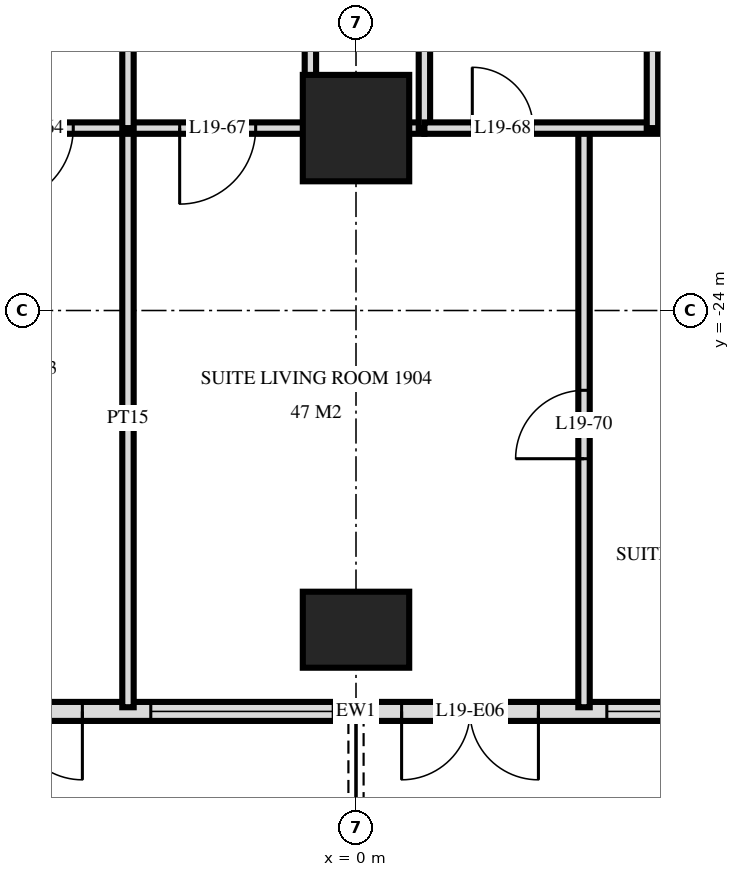
"""IFC4 building model, lengths in metres.
Left out: names, types, materials, properties, quantities, classifications, styles, units other than length and angle.
Written with IfcOpenShell. Run it as: python <this file> out.ifc"""

import sys

from ifc_helpers import new_model, si_unit, direction, frame, frame_2d, origin, origin_2d, place, context, subcontext, project, spatial, rectangle, extrude, element, fill, save


model = new_model("IFC4")
c1 = context("Model", 3, precision=1e-05, world=origin(), true_north=direction((0.0, 1.0)))
c2 = subcontext(c1, "Body", "Model", "MODEL_VIEW")
j1 = project(units=[si_unit("LENGTHUNIT", "METRE"), si_unit("PLANEANGLEUNIT", "RADIAN")], contexts=[c1])
p1 = place(None, origin())
s1 = spatial("IfcSite", under=j1, at=p1, CompositionType="ELEMENT")
p2 = place(p1, origin())
s2 = spatial("IfcBuilding", under=s1, at=p2, CompositionType="ELEMENT")
p3 = place(p2, frame((0.0, 0.0, 78.0)))
s3 = spatial("IfcBuildingStorey", under=s2, at=p3, CompositionType="ELEMENT", Elevation=78.0)
p4 = place(p3, frame((0.0, -28.2, 0.0), z_axis=(0.0, 0.0, 1.0), x_axis=(1.0, 0.0, 0.0)))
e1 = element("IfcColumn", 1, at=p4, inside=s3, PredefinedType="COLUMN", context=c2, shape_type="SweptSolid", body=[
    extrude(rectangle(XDim=1.4, YDim=1.0, at=origin_2d()), origin(), (0.0, 0.0, 1.0), 3.6),
])
p5 = place(p3, frame((0.0, -21.6, 0.0), z_axis=(0.0, 0.0, 1.0), x_axis=(1.0, 0.0, 0.0)))
e2 = element("IfcColumn", 2, at=p5, inside=s3, PredefinedType="COLUMN", context=c2, shape_type="SweptSolid", body=[
    extrude(rectangle(XDim=1.4, YDim=1.4, at=origin_2d()), origin(), (0.0, 0.0, 1.0), 3.6),
])
p6 = place(p3, frame((-28.775, -29.275, 0.0), z_axis=(0.0, 0.0, 1.0), x_axis=(1.0, 0.0, 0.0)))
e3 = element("IfcWall", 3, at=p6, inside=s3, PredefinedType="SOLIDWALL", context=c2, shape_type="SweptSolid", body=[
    extrude(rectangle(XDim=57.551, YDim=0.25, at=frame_2d((28.775, 0.0))), origin(), (0.0, 0.0, 1.0), 3.32),
])
p7 = place(p6, frame((0.575, 0.0, 0.0)))
e4 = element("IfcOpeningElement", 4, at=p7, cuts=e3, PredefinedType="OPENING", context=c2, shape_type="SweptSolid", body=[
    extrude(rectangle(XDim=1.8, YDim=2.4, at=frame_2d((0.9, 1.2))), frame((0.0, 0.135, 0.0), z_axis=(0.0, -1.0, 0.0), x_axis=(1.0, 0.0, 0.0)), (0.0, 0.0, 1.0), 0.27),
])
p8 = place(p6, frame((5.375, 0.0, 0.0)))
e5 = element("IfcOpeningElement", 5, at=p8, cuts=e3, PredefinedType="OPENING", context=c2, shape_type="SweptSolid", body=[
    extrude(rectangle(XDim=1.8, YDim=2.4, at=frame_2d((0.9, 1.2))), frame((0.0, 0.135, 0.0), z_axis=(0.0, -1.0, 0.0), x_axis=(1.0, 0.0, 0.0)), (0.0, 0.0, 1.0), 0.27),
])
p9 = place(p6, frame((8.075, 0.0, 0.3)))
e6 = element("IfcOpeningElement", 6, at=p9, cuts=e3, PredefinedType="OPENING", context=c2, shape_type="SweptSolid", body=[
    extrude(rectangle(XDim=2.4, YDim=2.1, at=frame_2d((1.2, 1.05))), frame((0.0, 0.135, 0.0), z_axis=(0.0, -1.0, 0.0), x_axis=(1.0, 0.0, 0.0)), (0.0, 0.0, 1.0), 0.27),
])
p10 = place(p6, frame((11.375, 0.0, 0.0)))
e7 = element("IfcOpeningElement", 7, at=p10, cuts=e3, PredefinedType="OPENING", context=c2, shape_type="SweptSolid", body=[
    extrude(rectangle(XDim=1.8, YDim=2.4, at=frame_2d((0.9, 1.2))), frame((0.0, 0.135, 0.0), z_axis=(0.0, -1.0, 0.0), x_axis=(1.0, 0.0, 0.0)), (0.0, 0.0, 1.0), 0.27),
])
p11 = place(p6, frame((14.075, 0.0, 0.3)))
e8 = element("IfcOpeningElement", 8, at=p11, cuts=e3, PredefinedType="OPENING", context=c2, shape_type="SweptSolid", body=[
    extrude(rectangle(XDim=2.4, YDim=2.1, at=frame_2d((1.2, 1.05))), frame((0.0, 0.135, 0.0), z_axis=(0.0, -1.0, 0.0), x_axis=(1.0, 0.0, 0.0)), (0.0, 0.0, 1.0), 0.27),
])
p12 = place(p6, frame((17.075, 0.0, 0.3)))
e9 = element("IfcOpeningElement", 9, at=p12, cuts=e3, PredefinedType="OPENING", context=c2, shape_type="SweptSolid", body=[
    extrude(rectangle(XDim=2.4, YDim=2.1, at=frame_2d((1.2, 1.05))), frame((0.0, 0.135, 0.0), z_axis=(0.0, -1.0, 0.0), x_axis=(1.0, 0.0, 0.0)), (0.0, 0.0, 1.0), 0.27),
])
p13 = place(p6, frame((20.375, 0.0, 0.0)))
e10 = element("IfcOpeningElement", 10, at=p13, cuts=e3, PredefinedType="OPENING", context=c2, shape_type="SweptSolid", body=[
    extrude(rectangle(XDim=1.8, YDim=2.4, at=frame_2d((0.9, 1.2))), frame((0.0, 0.135, 0.0), z_axis=(0.0, -1.0, 0.0), x_axis=(1.0, 0.0, 0.0)), (0.0, 0.0, 1.0), 0.27),
])
p14 = place(p6, frame((23.375, 0.0, 0.0)))
e11 = element("IfcOpeningElement", 11, at=p14, cuts=e3, PredefinedType="OPENING", context=c2, shape_type="SweptSolid", body=[
    extrude(rectangle(XDim=1.8, YDim=2.4, at=frame_2d((0.9, 1.2))), frame((0.0, 0.135, 0.0), z_axis=(0.0, -1.0, 0.0), x_axis=(1.0, 0.0, 0.0)), (0.0, 0.0, 1.0), 0.27),
])
p15 = place(p6, frame((26.075, 0.0, 0.3)))
e12 = element("IfcOpeningElement", 12, at=p15, cuts=e3, PredefinedType="OPENING", context=c2, shape_type="SweptSolid", body=[
    extrude(rectangle(XDim=2.4, YDim=2.1, at=frame_2d((1.2, 1.05))), frame((0.0, 0.135, 0.0), z_axis=(0.0, -1.0, 0.0), x_axis=(1.0, 0.0, 0.0)), (0.0, 0.0, 1.0), 0.27),
])
p16 = place(p6, frame((29.375, 0.0, 0.0)))
e13 = element("IfcOpeningElement", 13, at=p16, cuts=e3, PredefinedType="OPENING", context=c2, shape_type="SweptSolid", body=[
    extrude(rectangle(XDim=1.8, YDim=2.4, at=frame_2d((0.9, 1.2))), frame((0.0, 0.135, 0.0), z_axis=(0.0, -1.0, 0.0), x_axis=(1.0, 0.0, 0.0)), (0.0, 0.0, 1.0), 0.27),
])
p17 = place(p6, frame((32.075, 0.0, 0.3)))
e14 = element("IfcOpeningElement", 14, at=p17, cuts=e3, PredefinedType="OPENING", context=c2, shape_type="SweptSolid", body=[
    extrude(rectangle(XDim=2.4, YDim=2.1, at=frame_2d((1.2, 1.05))), frame((0.0, 0.135, 0.0), z_axis=(0.0, -1.0, 0.0), x_axis=(1.0, 0.0, 0.0)), (0.0, 0.0, 1.0), 0.27),
])
p18 = place(p6, frame((35.375, 0.0, 0.0)))
e15 = element("IfcOpeningElement", 15, at=p18, cuts=e3, PredefinedType="OPENING", context=c2, shape_type="SweptSolid", body=[
    extrude(rectangle(XDim=1.8, YDim=2.4, at=frame_2d((0.9, 1.2))), frame((0.0, 0.135, 0.0), z_axis=(0.0, -1.0, 0.0), x_axis=(1.0, 0.0, 0.0)), (0.0, 0.0, 1.0), 0.27),
])
p19 = place(p6, frame((38.075, 0.0, 0.3)))
e16 = element("IfcOpeningElement", 16, at=p19, cuts=e3, PredefinedType="OPENING", context=c2, shape_type="SweptSolid", body=[
    extrude(rectangle(XDim=2.4, YDim=2.1, at=frame_2d((1.2, 1.05))), frame((0.0, 0.135, 0.0), z_axis=(0.0, -1.0, 0.0), x_axis=(1.0, 0.0, 0.0)), (0.0, 0.0, 1.0), 0.27),
])
p20 = place(p6, frame((41.375, 0.0, 0.0)))
e17 = element("IfcOpeningElement", 17, at=p20, cuts=e3, PredefinedType="OPENING", context=c2, shape_type="SweptSolid", body=[
    extrude(rectangle(XDim=1.8, YDim=2.4, at=frame_2d((0.9, 1.2))), frame((0.0, 0.135, 0.0), z_axis=(0.0, -1.0, 0.0), x_axis=(1.0, 0.0, 0.0)), (0.0, 0.0, 1.0), 0.27),
])
p21 = place(p6, frame((44.075, 0.0, 0.3)))
e18 = element("IfcOpeningElement", 18, at=p21, cuts=e3, PredefinedType="OPENING", context=c2, shape_type="SweptSolid", body=[
    extrude(rectangle(XDim=2.4, YDim=2.1, at=frame_2d((1.2, 1.05))), frame((0.0, 0.135, 0.0), z_axis=(0.0, -1.0, 0.0), x_axis=(1.0, 0.0, 0.0)), (0.0, 0.0, 1.0), 0.27),
])
p22 = place(p6, frame((47.075, 0.0, 0.3)))
e19 = element("IfcOpeningElement", 19, at=p22, cuts=e3, PredefinedType="OPENING", context=c2, shape_type="SweptSolid", body=[
    extrude(rectangle(XDim=2.4, YDim=2.1, at=frame_2d((1.2, 1.05))), frame((0.0, 0.135, 0.0), z_axis=(0.0, -1.0, 0.0), x_axis=(1.0, 0.0, 0.0)), (0.0, 0.0, 1.0), 0.27),
])
p23 = place(p6, frame((50.375, 0.0, 0.0)))
e20 = element("IfcOpeningElement", 20, at=p23, cuts=e3, PredefinedType="OPENING", context=c2, shape_type="SweptSolid", body=[
    extrude(rectangle(XDim=1.8, YDim=2.4, at=frame_2d((0.9, 1.2))), frame((0.0, 0.135, 0.0), z_axis=(0.0, -1.0, 0.0), x_axis=(1.0, 0.0, 0.0)), (0.0, 0.0, 1.0), 0.27),
])
p24 = place(p6, frame((53.375, 0.0, 0.0)))
e21 = element("IfcOpeningElement", 21, at=p24, cuts=e3, PredefinedType="OPENING", context=c2, shape_type="SweptSolid", body=[
    extrude(rectangle(XDim=1.8, YDim=2.4, at=frame_2d((0.9, 1.2))), frame((0.0, 0.135, 0.0), z_axis=(0.0, -1.0, 0.0), x_axis=(1.0, 0.0, 0.0)), (0.0, 0.0, 1.0), 0.27),
])
p25 = place(p3, frame((3.9, -21.6, 0.0), z_axis=(0.0, 0.0, 1.0), x_axis=(0.0, 1.0, 0.0)))
e22 = element("IfcWall", 22, at=p25, inside=s3, PredefinedType="PARTITIONING", context=c2, shape_type="SweptSolid", body=[
    extrude(rectangle(XDim=4.2, YDim=0.15, at=frame_2d((2.1, 0.0))), origin(), (0.0, 0.0, 1.0), 3.32),
])
p26 = place(p3, frame((3.0, -29.22, 0.0), z_axis=(0.0, 0.0, 1.0), x_axis=(0.0, 1.0, 0.0)))
e23 = element("IfcWall", 23, at=p26, inside=s3, PredefinedType="PARTITIONING", context=c2, shape_type="SweptSolid", body=[
    extrude(rectangle(XDim=7.62, YDim=0.15, at=frame_2d((3.81, 0.0))), origin(), (0.0, 0.0, 1.0), 3.32),
])
p27 = place(p26, frame((3.27, 0.0, 0.0)))
e24 = element("IfcOpeningElement", 24, at=p27, cuts=e23, PredefinedType="OPENING", context=c2, shape_type="SweptSolid", body=[
    extrude(rectangle(XDim=0.9, YDim=2.1, at=frame_2d((0.45, 1.05))), frame((0.0, 0.085, 0.0), z_axis=(0.0, -1.0, 0.0), x_axis=(1.0, 0.0, 0.0)), (0.0, 0.0, 1.0), 0.17),
])
p28 = place(p3, frame((0.9, -21.6, 0.0), z_axis=(0.0, 0.0, 1.0), x_axis=(0.0, 1.0, 0.0)))
e25 = element("IfcWall", 25, at=p28, inside=s3, PredefinedType="PLUMBINGWALL", context=c2, shape_type="SweptSolid", body=[
    extrude(rectangle(XDim=4.2, YDim=0.15, at=frame_2d((2.1, 0.0))), origin(), (0.0, 0.0, 1.0), 3.32),
])
p29 = place(p3, frame((-0.6, -21.6, 0.0), z_axis=(0.0, 0.0, 1.0), x_axis=(0.0, 1.0, 0.0)))
e26 = element("IfcWall", 26, at=p29, inside=s3, PredefinedType="PARTITIONING", context=c2, shape_type="SweptSolid", body=[
    extrude(rectangle(XDim=4.2, YDim=0.15, at=frame_2d((2.1, 0.0))), origin(), (0.0, 0.0, 1.0), 3.32),
])
p30 = place(p29, frame((1.62, 0.0, 0.0)))
e27 = element("IfcOpeningElement", 27, at=p30, cuts=e26, PredefinedType="OPENING", context=c2, shape_type="SweptSolid", body=[
    extrude(rectangle(XDim=1.0, YDim=2.1, at=frame_2d((0.5, 1.05))), frame((0.0, 0.085, 0.0), z_axis=(0.0, -1.0, 0.0), x_axis=(1.0, 0.0, 0.0)), (0.0, 0.0, 1.0), 0.17),
])
p31 = place(p3, frame((-3.0, -21.6, 0.0), z_axis=(0.0, 0.0, 1.0), x_axis=(0.0, 1.0, 0.0)))
e28 = element("IfcWall", 28, at=p31, inside=s3, PredefinedType="PARTITIONING", context=c2, shape_type="SweptSolid", body=[
    extrude(rectangle(XDim=4.2, YDim=0.15, at=frame_2d((2.1, 0.0))), origin(), (0.0, 0.0, 1.0), 3.32),
])
p32 = place(p3, frame((-3.0, -29.22, 0.0), z_axis=(0.0, 0.0, 1.0), x_axis=(0.0, 1.0, 0.0)))
e29 = element("IfcWall", 29, at=p32, inside=s3, PredefinedType="PARTITIONING", context=c2, shape_type="SweptSolid", body=[
    extrude(rectangle(XDim=7.62, YDim=0.15, at=frame_2d((3.81, 0.0))), origin(), (0.0, 0.0, 1.0), 3.32),
])
p33 = place(p3, frame((-5.4, -21.6, 0.0), z_axis=(0.0, 0.0, 1.0), x_axis=(1.0, 0.0, 0.0)))
e30 = element("IfcWall", 30, at=p33, inside=s3, PredefinedType="PARTITIONING", context=c2, shape_type="SweptSolid", body=[
    extrude(rectangle(XDim=4.8, YDim=0.15, at=frame_2d((2.4, 0.0))), origin(), (0.0, 0.0, 1.0), 3.32),
])
p34 = place(p33, frame((0.68, 0.0, 0.0)))
e31 = element("IfcOpeningElement", 31, at=p34, cuts=e30, PredefinedType="OPENING", context=c2, shape_type="SweptSolid", body=[
    extrude(rectangle(XDim=1.0, YDim=2.1, at=frame_2d((0.5, 1.05))), frame((0.0, 0.085, 0.0), z_axis=(0.0, -1.0, 0.0), x_axis=(1.0, 0.0, 0.0)), (0.0, 0.0, 1.0), 0.17),
])
p35 = place(p33, frame((3.08, 0.0, 0.0)))
e32 = element("IfcOpeningElement", 32, at=p35, cuts=e30, PredefinedType="OPENING", context=c2, shape_type="SweptSolid", body=[
    extrude(rectangle(XDim=1.0, YDim=2.1, at=frame_2d((0.5, 1.05))), frame((0.0, 0.085, 0.0), z_axis=(0.0, -1.0, 0.0), x_axis=(1.0, 0.0, 0.0)), (0.0, 0.0, 1.0), 0.17),
])
p36 = place(p3, frame((0.9, -21.6, 0.0), z_axis=(0.0, 0.0, 1.0), x_axis=(1.0, 0.0, 0.0)))
e33 = element("IfcWall", 33, at=p36, inside=s3, PredefinedType="PARTITIONING", context=c2, shape_type="SweptSolid", body=[
    extrude(rectangle(XDim=5.1, YDim=0.15, at=frame_2d((2.55, 0.0))), origin(), (0.0, 0.0, 1.0), 3.32),
])
p37 = place(p36, frame((0.63, 0.0, 0.0)))
e34 = element("IfcOpeningElement", 34, at=p37, cuts=e33, PredefinedType="OPENING", context=c2, shape_type="SweptSolid", body=[
    extrude(rectangle(XDim=0.8, YDim=2.1, at=frame_2d((0.4, 1.05))), frame((0.0, 0.085, 0.0), z_axis=(0.0, -1.0, 0.0), x_axis=(1.0, 0.0, 0.0)), (0.0, 0.0, 1.0), 0.17),
])
p38 = place(p36, frame((3.4, 0.0, 0.0)))
e35 = element("IfcOpeningElement", 35, at=p38, cuts=e33, PredefinedType="OPENING", context=c2, shape_type="SweptSolid", body=[
    extrude(rectangle(XDim=0.9, YDim=2.1, at=frame_2d((0.45, 1.05))), frame((0.0, 0.085, 0.0), z_axis=(0.0, -1.0, 0.0), x_axis=(1.0, 0.0, 0.0)), (0.0, 0.0, 1.0), 0.17),
])
p39 = place(p3, frame((-0.6, -21.6, 0.0), z_axis=(0.0, 0.0, 1.0), x_axis=(1.0, 0.0, 0.0)))
e36 = element("IfcWall", 36, at=p39, inside=s3, PredefinedType="PLUMBINGWALL", context=c2, shape_type="SweptSolid", body=[
    extrude(rectangle(XDim=1.5, YDim=0.15, at=frame_2d((0.75, 0.0))), origin(), (0.0, 0.0, 1.0), 3.32),
])
p40 = place(p14, frame((0.9, 0.0, 0.0), z_axis=(0.0, 0.0, 1.0), x_axis=(-1.0, 0.0, 0.0)))
e37 = element("IfcDoor", 37, at=p40, inside=s3, OperationType="DOUBLE_DOOR_SINGLE_SWING", PredefinedType="DOOR", context=c2, shape_type="SweptSolid", body=[
    extrude(rectangle(XDim=1.8, YDim=2.4, at=frame_2d((0.0, 1.2))), frame((0.0, -0.025, 0.0), z_axis=(0.0, 1.0, 0.0), x_axis=(-1.0, 0.0, 0.0)), (0.0, 0.0, 1.0), 0.05),
])
fill(e11, e37)
p41 = place(p15, origin())
e38 = element("IfcWindow", 38, at=p41, inside=s3, PartitioningType="SINGLE_PANEL", PredefinedType="WINDOW", context=c2, shape_type="SweptSolid", body=[
    extrude(rectangle(XDim=2.4, YDim=2.1, at=frame_2d((1.2, 1.05))), frame((0.0, 0.03, 0.0), z_axis=(0.0, -1.0, 0.0), x_axis=(1.0, 0.0, 0.0)), (0.0, 0.0, 1.0), 0.06),
])
fill(e12, e38)
p42 = place(p16, frame((0.9, 0.0, 0.0), z_axis=(0.0, 0.0, 1.0), x_axis=(-1.0, 0.0, 0.0)))
e39 = element("IfcDoor", 39, at=p42, inside=s3, OperationType="DOUBLE_DOOR_SINGLE_SWING", PredefinedType="DOOR", context=c2, shape_type="SweptSolid", body=[
    extrude(rectangle(XDim=1.8, YDim=2.4, at=frame_2d((0.0, 1.2))), frame((0.0, -0.025, 0.0), z_axis=(0.0, 1.0, 0.0), x_axis=(-1.0, 0.0, 0.0)), (0.0, 0.0, 1.0), 0.05),
])
fill(e13, e39)
p43 = place(p17, origin())
e40 = element("IfcWindow", 40, at=p43, inside=s3, PartitioningType="SINGLE_PANEL", PredefinedType="WINDOW", context=c2, shape_type="SweptSolid", body=[
    extrude(rectangle(XDim=2.4, YDim=2.1, at=frame_2d((1.2, 1.05))), frame((0.0, 0.03, 0.0), z_axis=(0.0, -1.0, 0.0), x_axis=(1.0, 0.0, 0.0)), (0.0, 0.0, 1.0), 0.06),
])
fill(e14, e40)
p44 = place(p34, frame((0.5, 0.0, 0.0), z_axis=(0.0, 0.0, 1.0), x_axis=(-1.0, 0.0, 0.0)))
e41 = element("IfcDoor", 41, at=p44, inside=s3, OperationType="SINGLE_SWING_LEFT", PredefinedType="DOOR", context=c2, shape_type="SweptSolid", body=[
    extrude(rectangle(XDim=1.0, YDim=2.1, at=frame_2d((0.0, 1.05))), frame((0.0, -0.025, 0.0), z_axis=(0.0, 1.0, 0.0), x_axis=(-1.0, 0.0, 0.0)), (0.0, 0.0, 1.0), 0.05),
])
fill(e31, e41)
p45 = place(p35, frame((0.5, 0.0, 0.0), z_axis=(0.0, 0.0, 1.0), x_axis=(-1.0, 0.0, 0.0)))
e42 = element("IfcDoor", 42, at=p45, inside=s3, OperationType="SINGLE_SWING_LEFT", PredefinedType="DOOR", context=c2, shape_type="SweptSolid", body=[
    extrude(rectangle(XDim=1.0, YDim=2.1, at=frame_2d((0.0, 1.05))), frame((0.0, -0.025, 0.0), z_axis=(0.0, 1.0, 0.0), x_axis=(-1.0, 0.0, 0.0)), (0.0, 0.0, 1.0), 0.05),
])
fill(e32, e42)
p46 = place(p37, origin())
e43 = element("IfcDoor", 43, at=p46, inside=s3, OperationType="SINGLE_SWING_RIGHT", PredefinedType="DOOR", context=c2, shape_type="SweptSolid", body=[
    extrude(rectangle(XDim=0.8, YDim=2.1, at=frame_2d((0.4, 1.05))), frame((0.0, 0.025, 0.0), z_axis=(0.0, -1.0, 0.0), x_axis=(1.0, 0.0, 0.0)), (0.0, 0.0, 1.0), 0.05),
])
fill(e34, e43)
p47 = place(p27, origin())
e44 = element("IfcDoor", 44, at=p47, inside=s3, OperationType="SINGLE_SWING_RIGHT", PredefinedType="DOOR", context=c2, shape_type="SweptSolid", body=[
    extrude(rectangle(XDim=0.9, YDim=2.1, at=frame_2d((0.45, 1.05))), frame((0.0, 0.025, 0.0), z_axis=(0.0, -1.0, 0.0), x_axis=(1.0, 0.0, 0.0)), (0.0, 0.0, 1.0), 0.05),
])
fill(e24, e44)
save(model, sys.argv[1])
